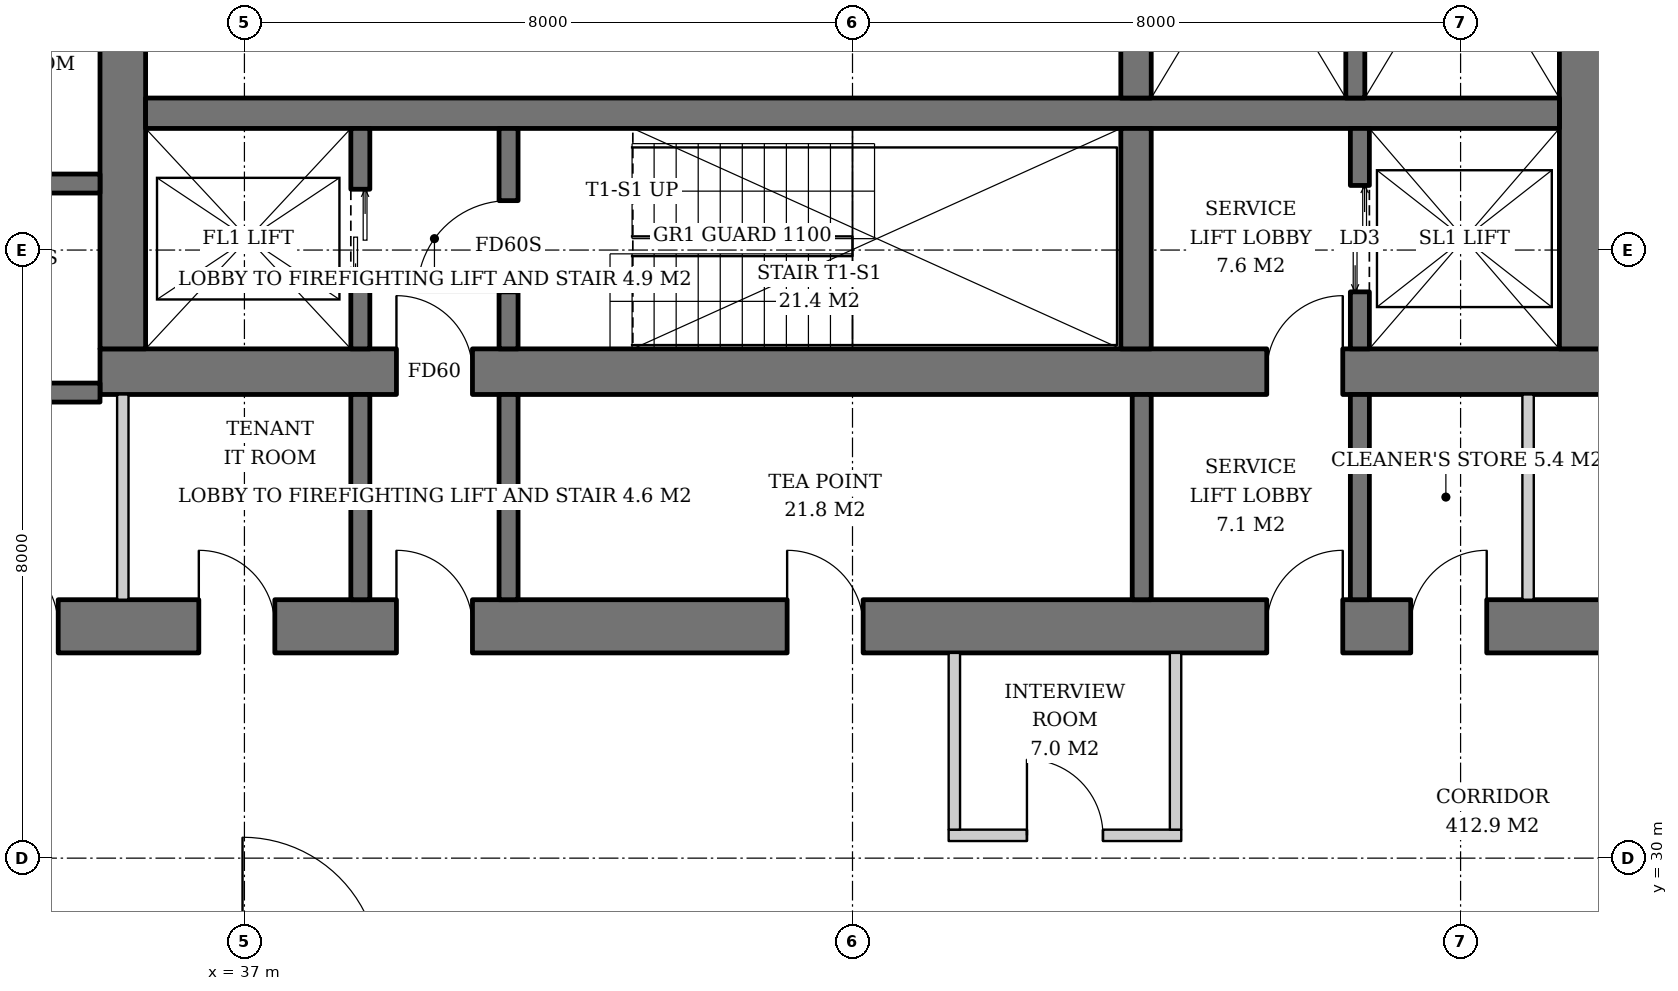
"""IFC4 building model, lengths in metres.
Left out: names, types, materials, properties, quantities, classifications, styles, units other than length and angle.
Written with IfcOpenShell. Run it as: python <this file> out.ifc"""

import sys

from ifc_helpers import new_model, si_unit, direction, frame, frame_2d, origin, place, context, subcontext, project, spatial, rectangle, extrude, element, fill, save


model = new_model("IFC4")
c1 = context("Model", 3, precision=1e-05, world=origin(), true_north=direction((0.0, 1.0)))
c2 = subcontext(c1, "Body", "Model", "MODEL_VIEW")
j1 = project(units=[si_unit("LENGTHUNIT", "METRE"), si_unit("PLANEANGLEUNIT", "RADIAN")], contexts=[c1])
p1 = place(None, origin())
s1 = spatial("IfcSite", under=j1, at=p1, CompositionType="ELEMENT")
p2 = place(p1, origin())
s2 = spatial("IfcBuilding", under=s1, at=p2, CompositionType="ELEMENT")
p3 = place(p2, frame((0.0, 0.0, 119.8)))
s3 = spatial("IfcBuildingStorey", under=s2, at=p3, CompositionType="ELEMENT", Elevation=119.8)
p4 = place(p3, frame((35.1, 36.4, 0.0), z_axis=(0.0, 0.0, 1.0), x_axis=(1.0, 0.0, 0.0)))
e1 = element("IfcWall", 1, at=p4, inside=s3, PredefinedType="SHEAR", context=c2, shape_type="SweptSolid", body=[
    extrude(rectangle(XDim=19.8, YDim=0.6, at=frame_2d((9.9, 0.0))), origin(), (0.0, 0.0, 1.0), 3.8),
])
p5 = place(p4, frame((3.9, 0.0, 0.0)))
e2 = element("IfcOpeningElement", 2, at=p5, cuts=e1, PredefinedType="OPENING", context=c2, shape_type="SweptSolid", body=[
    extrude(rectangle(XDim=1.0, YDim=2.1, at=frame_2d((0.5, 1.05))), frame((0.0, 0.31, 0.0), z_axis=(0.0, -1.0, 0.0), x_axis=(1.0, 0.0, 0.0)), (0.0, 0.0, 1.0), 0.62),
])
p6 = place(p4, frame((15.35, 0.0, 0.0)))
e3 = element("IfcOpeningElement", 3, at=p6, cuts=e1, PredefinedType="OPENING", context=c2, shape_type="SweptSolid", body=[
    extrude(rectangle(XDim=1.0, YDim=2.1, at=frame_2d((0.5, 1.05))), frame((0.0, 0.31, 0.0), z_axis=(0.0, -1.0, 0.0), x_axis=(1.0, 0.0, 0.0)), (0.0, 0.0, 1.0), 0.62),
])
p7 = place(p3, frame((35.4, 36.7, 0.0), z_axis=(0.0, 0.0, 1.0), x_axis=(0.0, 1.0, 0.0)))
e4 = element("IfcWall", 4, at=p7, inside=s3, PredefinedType="SHEAR", context=c2, shape_type="SweptSolid", body=[
    extrude(rectangle(XDim=18.6, YDim=0.6, at=frame_2d((9.3, 0.0))), origin(), (0.0, 0.0, 1.0), 3.8),
])
p8 = place(p7, frame((8.4, 0.0, 0.0)))
e5 = element("IfcOpeningElement", 5, at=p8, cuts=e4, PredefinedType="OPENING", context=c2, shape_type="SweptSolid", body=[
    extrude(rectangle(XDim=1.8, YDim=2.4, at=frame_2d((0.9, 1.2))), frame((0.0, 0.31, 0.0), z_axis=(0.0, -1.0, 0.0), x_axis=(1.0, 0.0, 0.0)), (0.0, 0.0, 1.0), 0.62),
])
p9 = place(p3, frame((54.6, 36.7, 0.0), z_axis=(0.0, 0.0, 1.0), x_axis=(0.0, 1.0, 0.0)))
e6 = element("IfcWall", 6, at=p9, inside=s3, PredefinedType="SHEAR", context=c2, shape_type="SweptSolid", body=[
    extrude(rectangle(XDim=18.6, YDim=0.6, at=frame_2d((9.3, 0.0))), origin(), (0.0, 0.0, 1.0), 3.8),
])
p10 = place(p9, frame((8.4, 0.0, 0.0)))
e7 = element("IfcOpeningElement", 7, at=p10, cuts=e6, PredefinedType="OPENING", context=c2, shape_type="SweptSolid", body=[
    extrude(rectangle(XDim=1.8, YDim=2.4, at=frame_2d((0.9, 1.2))), frame((0.0, 0.31, 0.0), z_axis=(0.0, -1.0, 0.0), x_axis=(1.0, 0.0, 0.0)), (0.0, 0.0, 1.0), 0.62),
])
p11 = place(p3, frame((31.7, 33.05, 0.0), z_axis=(0.0, 0.0, 1.0), x_axis=(1.0, 0.0, 0.0)))
e8 = element("IfcWall", 8, at=p11, inside=s3, PredefinedType="SHEAR", context=c2, shape_type="SweptSolid", body=[
    extrude(rectangle(XDim=26.6, YDim=0.7, at=frame_2d((13.3, 0.0))), origin(), (0.0, 0.0, 1.0), 3.8),
])
p12 = place(p11, frame((7.3, 0.0, 0.0)))
e9 = element("IfcOpeningElement", 9, at=p12, cuts=e8, PredefinedType="OPENING", context=c2, shape_type="SweptSolid", body=[
    extrude(rectangle(XDim=1.0, YDim=2.1, at=frame_2d((0.5, 1.05))), frame((0.0, 0.36, 0.0), z_axis=(0.0, -1.0, 0.0), x_axis=(1.0, 0.0, 0.0)), (0.0, 0.0, 1.0), 0.72),
])
p13 = place(p11, frame((18.75, 0.0, 0.0)))
e10 = element("IfcOpeningElement", 10, at=p13, cuts=e8, PredefinedType="OPENING", context=c2, shape_type="SweptSolid", body=[
    extrude(rectangle(XDim=1.0, YDim=2.1, at=frame_2d((0.5, 1.05))), frame((0.0, 0.36, 0.0), z_axis=(0.0, -1.0, 0.0), x_axis=(1.0, 0.0, 0.0)), (0.0, 0.0, 1.0), 0.72),
])
p14 = place(p11, frame((1.85, 0.0, 0.0)))
e11 = element("IfcOpeningElement", 11, at=p14, cuts=e8, PredefinedType="OPENING", context=c2, shape_type="SweptSolid", body=[
    extrude(rectangle(XDim=1.0, YDim=2.1, at=frame_2d((0.5, 1.05))), frame((0.0, 0.36, 0.0), z_axis=(0.0, -1.0, 0.0), x_axis=(1.0, 0.0, 0.0)), (0.0, 0.0, 1.0), 0.72),
])
p15 = place(p11, frame((4.7, 0.0, 0.0)))
e12 = element("IfcOpeningElement", 12, at=p15, cuts=e8, PredefinedType="OPENING", context=c2, shape_type="SweptSolid", body=[
    extrude(rectangle(XDim=1.0, YDim=2.1, at=frame_2d((0.5, 1.05))), frame((0.0, 0.36, 0.0), z_axis=(0.0, -1.0, 0.0), x_axis=(1.0, 0.0, 0.0)), (0.0, 0.0, 1.0), 0.72),
])
p16 = place(p11, frame((12.44, 0.0, 0.0)))
e13 = element("IfcOpeningElement", 13, at=p16, cuts=e8, PredefinedType="OPENING", context=c2, shape_type="SweptSolid", body=[
    extrude(rectangle(XDim=1.0, YDim=2.1, at=frame_2d((0.5, 1.05))), frame((0.0, 0.36, 0.0), z_axis=(0.0, -1.0, 0.0), x_axis=(1.0, 0.0, 0.0)), (0.0, 0.0, 1.0), 0.72),
])
p17 = place(p11, frame((20.644, 0.0, 0.0)))
e14 = element("IfcOpeningElement", 14, at=p17, cuts=e8, PredefinedType="OPENING", context=c2, shape_type="SweptSolid", body=[
    extrude(rectangle(XDim=1.0, YDim=2.1, at=frame_2d((0.5, 1.05))), frame((0.0, 0.36, 0.0), z_axis=(0.0, -1.0, 0.0), x_axis=(1.0, 0.0, 0.0)), (0.0, 0.0, 1.0), 0.72),
])
p18 = place(p11, frame((23.544, 0.0, 0.0)))
e15 = element("IfcOpeningElement", 15, at=p18, cuts=e8, PredefinedType="OPENING", context=c2, shape_type="SweptSolid", body=[
    extrude(rectangle(XDim=1.0, YDim=2.1, at=frame_2d((0.5, 1.05))), frame((0.0, 0.36, 0.0), z_axis=(0.0, -1.0, 0.0), x_axis=(1.0, 0.0, 0.0)), (0.0, 0.0, 1.0), 0.72),
])
p19 = place(p3, frame((35.7, 39.8, 0.0), z_axis=(0.0, 0.0, 1.0), x_axis=(1.0, 0.0, 0.0)))
e16 = element("IfcWall", 16, at=p19, inside=s3, PredefinedType="SHEAR", context=c2, shape_type="SweptSolid", body=[
    extrude(rectangle(XDim=18.6, YDim=0.4, at=frame_2d((9.3, 0.0))), origin(), (0.0, 0.0, 1.0), 3.8),
])
p20 = place(p3, frame((48.73, 36.7, 0.0), z_axis=(0.0, 0.0, 1.0), x_axis=(0.0, 1.0, 0.0)))
e17 = element("IfcWall", 17, at=p20, inside=s3, PredefinedType="SHEAR", context=c2, shape_type="SweptSolid", body=[
    extrude(rectangle(XDim=2.9, YDim=0.4, at=frame_2d((1.45, 0.0))), origin(), (0.0, 0.0, 1.0), 3.8),
])
p21 = place(p3, frame((48.73, 40.0, 0.0), z_axis=(0.0, 0.0, 1.0), x_axis=(0.0, 1.0, 0.0)))
e18 = element("IfcWall", 18, at=p21, inside=s3, PredefinedType="SHEAR", context=c2, shape_type="SweptSolid", body=[
    extrude(rectangle(XDim=12.0, YDim=0.4, at=frame_2d((6.0, 0.0))), origin(), (0.0, 0.0, 1.0), 3.8),
])
p22 = place(p3, frame((38.525, 36.7, 0.0), z_axis=(0.0, 0.0, 1.0), x_axis=(0.0, 1.0, 0.0)))
e19 = element("IfcWall", 19, at=p22, inside=s3, PredefinedType="SHEAR", context=c2, shape_type="SweptSolid", body=[
    extrude(rectangle(XDim=2.9, YDim=0.25, at=frame_2d((1.45, 0.0))), origin(), (0.0, 0.0, 1.0), 3.8),
])
p23 = place(p22, frame((0.8, 0.0, 0.0)))
e20 = element("IfcOpeningElement", 20, at=p23, cuts=e19, PredefinedType="OPENING", context=c2, shape_type="SweptSolid", body=[
    extrude(rectangle(XDim=1.3, YDim=2.2, at=frame_2d((0.65, 1.1))), frame((0.0, 0.135, 0.0), z_axis=(0.0, -1.0, 0.0), x_axis=(1.0, 0.0, 0.0)), (0.0, 0.0, 1.0), 0.27),
])
p24 = place(p3, frame((40.475, 36.7, 0.0), z_axis=(0.0, 0.0, 1.0), x_axis=(0.0, 1.0, 0.0)))
e21 = element("IfcWall", 21, at=p24, inside=s3, PredefinedType="SHEAR", context=c2, shape_type="SweptSolid", body=[
    extrude(rectangle(XDim=2.9, YDim=0.25, at=frame_2d((1.45, 0.0))), origin(), (0.0, 0.0, 1.0), 3.8),
])
p25 = place(p24, frame((0.75, 0.0, 0.0)))
e22 = element("IfcOpeningElement", 22, at=p25, cuts=e21, PredefinedType="OPENING", context=c2, shape_type="SweptSolid", body=[
    extrude(rectangle(XDim=1.2, YDim=2.1, at=frame_2d((0.6, 1.05))), frame((0.0, 0.135, 0.0), z_axis=(0.0, -1.0, 0.0), x_axis=(1.0, 0.0, 0.0)), (0.0, 0.0, 1.0), 0.27),
])
p26 = place(p3, frame((51.675, 36.7, 0.0), z_axis=(0.0, 0.0, 1.0), x_axis=(0.0, 1.0, 0.0)))
e23 = element("IfcWall", 23, at=p26, inside=s3, PredefinedType="SHEAR", context=c2, shape_type="SweptSolid", body=[
    extrude(rectangle(XDim=2.9, YDim=0.25, at=frame_2d((1.45, 0.0))), origin(), (0.0, 0.0, 1.0), 3.8),
])
p27 = place(p26, frame((0.75, 0.0, 0.0)))
e24 = element("IfcOpeningElement", 24, at=p27, cuts=e23, PredefinedType="OPENING", context=c2, shape_type="SweptSolid", body=[
    extrude(rectangle(XDim=1.4, YDim=2.4, at=frame_2d((0.7, 1.2))), frame((0.0, 0.135, 0.0), z_axis=(0.0, -1.0, 0.0), x_axis=(1.0, 0.0, 0.0)), (0.0, 0.0, 1.0), 0.27),
])
p28 = place(p3, frame((51.615, 44.25, 0.0), z_axis=(0.0, 0.0, 1.0), x_axis=(0.0, -1.0, 0.0)))
e25 = element("IfcWall", 25, at=p28, inside=s3, PredefinedType="SHEAR", context=c2, shape_type="SweptSolid", body=[
    extrude(rectangle(XDim=4.25, YDim=0.25, at=frame_2d((2.125, 0.0))), origin(), (0.0, 0.0, 1.0), 3.8),
])
for number, where, z_axis, x_axis in (
    (26, (32.4, 36.125, 0.0), (0.0, 0.0, 1.0), (1.0, 0.0, 0.0)),
    (27, (32.4, 38.875, 0.0), (0.0, 0.0, 1.0), (1.0, 0.0, 0.0)),
):
    element("IfcWall", number, at=place(p3, frame(where, z_axis=z_axis, x_axis=x_axis)), inside=s3, PredefinedType="SHEAR", context=c2, shape_type="SweptSolid", body=[
        extrude(rectangle(XDim=2.7, YDim=0.25, at=frame_2d((1.35, 0.0))), origin(), (0.0, 0.0, 1.0), 3.8),
    ])
for number, where, z_axis, x_axis in (
    (28, (38.525, 33.4, 0.0), (0.0, 0.0, 1.0), (0.0, 1.0, 0.0)),
    (29, (40.475, 33.4, 0.0), (0.0, 0.0, 1.0), (0.0, 1.0, 0.0)),
    (30, (48.805, 33.4, 0.0), (0.0, 0.0, 1.0), (0.0, 1.0, 0.0)),
    (31, (51.675, 33.4, 0.0), (0.0, 0.0, 1.0), (0.0, 1.0, 0.0)),
):
    element("IfcWall", number, at=place(p3, frame(where, z_axis=z_axis, x_axis=x_axis)), inside=s3, PredefinedType="SOLIDWALL", context=c2, shape_type="SweptSolid", body=[
        extrude(rectangle(XDim=2.7, YDim=0.25, at=frame_2d((1.35, 0.0))), origin(), (0.0, 0.0, 1.0), 3.62),
    ])
for number, where, z_axis, x_axis in (
    (32, (35.4, 33.4, 0.0), (0.0, 0.0, 1.0), (0.0, 1.0, 0.0)),
    (33, (53.888, 33.4, 0.0), (0.0, 0.0, 1.0), (0.0, 1.0, 0.0)),
):
    element("IfcWall", number, at=place(p3, frame(where, z_axis=z_axis, x_axis=x_axis)), inside=s3, PredefinedType="SOLIDWALL", context=c2, shape_type="SweptSolid", body=[
        extrude(rectangle(XDim=2.7, YDim=0.15, at=frame_2d((1.35, 0.0))), origin(), (0.0, 0.0, 1.0), 3.62),
    ])
p29 = place(p3, frame((46.265, 30.3, 0.0), z_axis=(0.0, 0.0, 1.0), x_axis=(1.0, 0.0, 0.0)))
e34 = element("IfcWall", 34, at=p29, inside=s3, PredefinedType="PARTITIONING", context=c2, shape_type="SweptSolid", body=[
    extrude(rectangle(XDim=3.06, YDim=0.15, at=frame_2d((1.53, 0.0))), origin(), (0.0, 0.0, 1.0), 2.858),
])
p30 = place(p29, frame((1.03, 0.0, 0.0)))
e35 = element("IfcOpeningElement", 35, at=p30, cuts=e34, PredefinedType="OPENING", context=c2, shape_type="SweptSolid", body=[
    extrude(rectangle(XDim=1.0, YDim=2.1, at=frame_2d((0.5, 1.05))), frame((0.0, 0.085, 0.0), z_axis=(0.0, -1.0, 0.0), x_axis=(1.0, 0.0, 0.0)), (0.0, 0.0, 1.0), 0.17),
])
for number, where, z_axis, x_axis in (
    (36, (46.34, 32.7, 0.0), (0.0, 0.0, 1.0), (0.0, -1.0, 0.0)),
    (37, (49.25, 32.7, 0.0), (0.0, 0.0, 1.0), (0.0, -1.0, 0.0)),
):
    element("IfcWall", number, at=place(p3, frame(where, z_axis=z_axis, x_axis=x_axis)), inside=s3, PredefinedType="PARTITIONING", context=c2, shape_type="SweptSolid", body=[
        extrude(rectangle(XDim=2.325, YDim=0.15, at=frame_2d((1.163, 0.0))), origin(), (0.0, 0.0, 1.0), 3.62),
    ])
p31 = place(p23, origin())
e38 = element("IfcDoor", 38, at=p31, inside=s3, OperationType="DOUBLE_DOOR_SLIDING", PredefinedType="DOOR", context=c2, shape_type="SweptSolid", body=[
    extrude(rectangle(XDim=1.3, YDim=2.2, at=frame_2d((0.65, 1.1))), frame((0.0, 0.025, 0.0), z_axis=(0.0, -1.0, 0.0), x_axis=(1.0, 0.0, 0.0)), (0.0, 0.0, 1.0), 0.05),
])
fill(e20, e38)
p32 = place(p25, origin())
e39 = element("IfcDoor", 39, at=p32, inside=s3, OperationType="SINGLE_SWING_LEFT", PredefinedType="DOOR", context=c2, shape_type="SweptSolid", body=[
    extrude(rectangle(XDim=1.2, YDim=2.1, at=frame_2d((0.6, 1.05))), frame((0.0, 0.025, 0.0), z_axis=(0.0, -1.0, 0.0), x_axis=(1.0, 0.0, 0.0)), (0.0, 0.0, 1.0), 0.05),
])
fill(e22, e39)
p33 = place(p27, origin())
e40 = element("IfcDoor", 40, at=p33, inside=s3, OperationType="DOUBLE_DOOR_SLIDING", PredefinedType="DOOR", context=c2, shape_type="SweptSolid", body=[
    extrude(rectangle(XDim=1.4, YDim=2.4, at=frame_2d((0.7, 1.2))), frame((0.0, 0.025, 0.0), z_axis=(0.0, -1.0, 0.0), x_axis=(1.0, 0.0, 0.0)), (0.0, 0.0, 1.0), 0.05),
])
fill(e24, e40)
p34 = place(p5, origin())
e41 = element("IfcDoor", 41, at=p34, inside=s3, OperationType="SINGLE_SWING_LEFT", PredefinedType="DOOR", context=c2, shape_type="SweptSolid", body=[
    extrude(rectangle(XDim=1.0, YDim=2.1, at=frame_2d((0.5, 1.05))), frame((0.0, 0.025, 0.0), z_axis=(0.0, -1.0, 0.0), x_axis=(1.0, 0.0, 0.0)), (0.0, 0.0, 1.0), 0.05),
])
fill(e2, e41)
p35 = place(p6, origin())
e42 = element("IfcDoor", 42, at=p35, inside=s3, OperationType="SINGLE_SWING_RIGHT", PredefinedType="DOOR", context=c2, shape_type="SweptSolid", body=[
    extrude(rectangle(XDim=1.0, YDim=2.1, at=frame_2d((0.5, 1.05))), frame((0.0, 0.025, 0.0), z_axis=(0.0, -1.0, 0.0), x_axis=(1.0, 0.0, 0.0)), (0.0, 0.0, 1.0), 0.05),
])
fill(e3, e42)
p36 = place(p12, origin())
e43 = element("IfcDoor", 43, at=p36, inside=s3, OperationType="SINGLE_SWING_LEFT", PredefinedType="DOOR", context=c2, shape_type="SweptSolid", body=[
    extrude(rectangle(XDim=1.0, YDim=2.1, at=frame_2d((0.5, 1.05))), frame((0.0, 0.025, 0.0), z_axis=(0.0, -1.0, 0.0), x_axis=(1.0, 0.0, 0.0)), (0.0, 0.0, 1.0), 0.05),
])
fill(e9, e43)
p37 = place(p13, origin())
e44 = element("IfcDoor", 44, at=p37, inside=s3, OperationType="SINGLE_SWING_RIGHT", PredefinedType="DOOR", context=c2, shape_type="SweptSolid", body=[
    extrude(rectangle(XDim=1.0, YDim=2.1, at=frame_2d((0.5, 1.05))), frame((0.0, 0.025, 0.0), z_axis=(0.0, -1.0, 0.0), x_axis=(1.0, 0.0, 0.0)), (0.0, 0.0, 1.0), 0.05),
])
fill(e10, e44)
p38 = place(p14, origin())
e45 = element("IfcDoor", 45, at=p38, inside=s3, OperationType="SINGLE_SWING_LEFT", PredefinedType="DOOR", context=c2, shape_type="SweptSolid", body=[
    extrude(rectangle(XDim=1.0, YDim=2.1, at=frame_2d((0.5, 1.05))), frame((0.0, 0.34, 0.0), z_axis=(0.0, -1.0, 0.0), x_axis=(1.0, 0.0, 0.0)), (0.0, 0.0, 1.0), 0.05),
])
fill(e11, e45)
p39 = place(p15, origin())
e46 = element("IfcDoor", 46, at=p39, inside=s3, OperationType="SINGLE_SWING_LEFT", PredefinedType="DOOR", context=c2, shape_type="SweptSolid", body=[
    extrude(rectangle(XDim=1.0, YDim=2.1, at=frame_2d((0.5, 1.05))), frame((0.0, 0.34, 0.0), z_axis=(0.0, -1.0, 0.0), x_axis=(1.0, 0.0, 0.0)), (0.0, 0.0, 1.0), 0.05),
])
fill(e12, e46)
p40 = place(p16, origin())
e47 = element("IfcDoor", 47, at=p40, inside=s3, OperationType="SINGLE_SWING_LEFT", PredefinedType="DOOR", context=c2, shape_type="SweptSolid", body=[
    extrude(rectangle(XDim=1.0, YDim=2.1, at=frame_2d((0.5, 1.05))), frame((0.0, 0.34, 0.0), z_axis=(0.0, -1.0, 0.0), x_axis=(1.0, 0.0, 0.0)), (0.0, 0.0, 1.0), 0.05),
])
fill(e13, e47)
p41 = place(p17, origin())
e48 = element("IfcDoor", 48, at=p41, inside=s3, OperationType="SINGLE_SWING_RIGHT", PredefinedType="DOOR", context=c2, shape_type="SweptSolid", body=[
    extrude(rectangle(XDim=1.0, YDim=2.1, at=frame_2d((0.5, 1.05))), frame((0.0, 0.34, 0.0), z_axis=(0.0, -1.0, 0.0), x_axis=(1.0, 0.0, 0.0)), (0.0, 0.0, 1.0), 0.05),
])
fill(e14, e48)
p42 = place(p30, origin())
e49 = element("IfcDoor", 49, at=p42, inside=s3, OperationType="SINGLE_SWING_LEFT", PredefinedType="DOOR", context=c2, shape_type="SweptSolid", body=[
    extrude(rectangle(XDim=1.0, YDim=2.1, at=frame_2d((0.5, 1.05))), frame((0.0, 0.025, 0.0), z_axis=(0.0, -1.0, 0.0), x_axis=(1.0, 0.0, 0.0)), (0.0, 0.0, 1.0), 0.05),
])
fill(e35, e49)
save(model, sys.argv[1])
